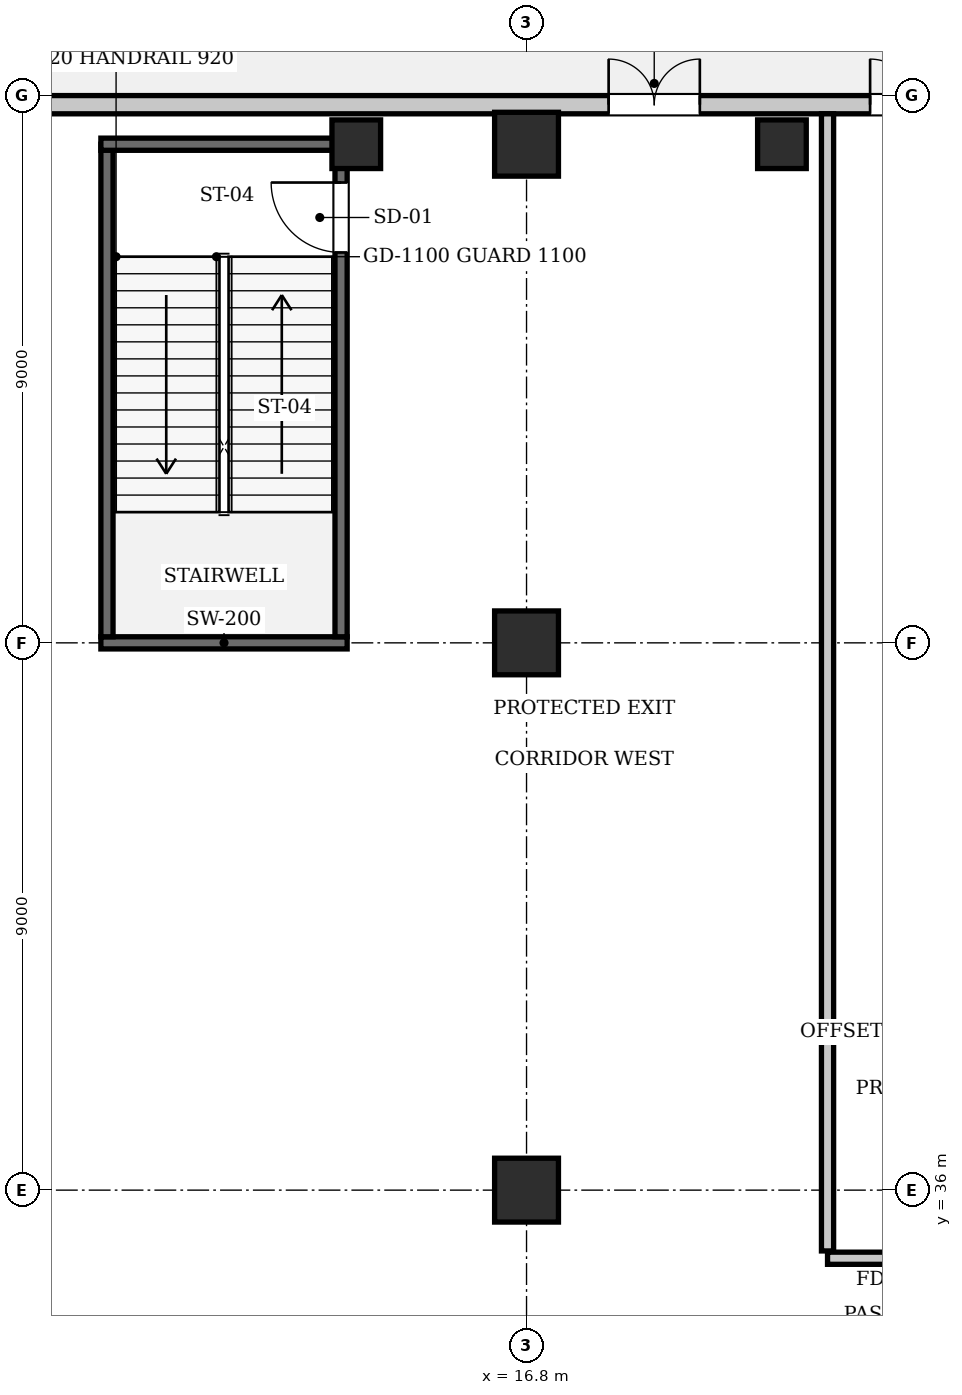
"""IFC4 building model, lengths in metres.
Left out: names, types, materials, properties, quantities, classifications, styles, units other than length and angle.
Written with IfcOpenShell. Run it as: python <this file> out.ifc"""

import sys

from ifc_helpers import new_model, si_unit, direction, frame, frame_2d, origin, origin_2d, place, context, subcontext, project, spatial, rectangle, extrude, element, fill, save


model = new_model("IFC4")
c1 = context("Model", 3, precision=1e-05, world=origin(), true_north=direction((0.0, 1.0)))
c2 = subcontext(c1, "Body", "Model", "MODEL_VIEW")
j1 = project(units=[si_unit("LENGTHUNIT", "METRE"), si_unit("PLANEANGLEUNIT", "RADIAN")], contexts=[c1])
p1 = place(None, origin())
s1 = spatial("IfcSite", under=j1, at=p1, CompositionType="ELEMENT")
p2 = place(p1, origin())
s2 = spatial("IfcBuilding", under=s1, at=p2, CompositionType="ELEMENT")
p3 = place(p2, origin())
s3 = spatial("IfcBuildingStorey", under=s2, at=p3, CompositionType="ELEMENT", Elevation=0.0)
for number, where, z_axis, x_axis in (
    (1, (16.8, 36.0, 0.0), (0.0, 0.0, 1.0), (1.0, 0.0, 0.0)),
    (2, (16.8, 45.0, 0.0), (0.0, 0.0, 1.0), (1.0, 0.0, 0.0)),
    (3, (16.8, 53.2, 0.0), (0.0, 0.0, 1.0), (1.0, 0.0, 0.0)),
):
    element("IfcColumn", number, at=place(p3, frame(where, z_axis=z_axis, x_axis=x_axis)), inside=s3, PredefinedType="COLUMN", context=c2, shape_type="SweptSolid", body=[
        extrude(rectangle(XDim=1.05, YDim=1.05, at=origin_2d()), origin(), (0.0, 0.0, 1.0), 5.6),
    ])
for number, where, z_axis, x_axis in (
    (4, (14.0, 53.2, 0.0), (0.0, 0.0, 1.0), (1.0, 0.0, 0.0)),
    (5, (21.0, 53.2, 0.0), (0.0, 0.0, 1.0), (1.0, 0.0, 0.0)),
):
    element("IfcColumn", number, at=place(p3, frame(where, z_axis=z_axis, x_axis=x_axis)), inside=s3, PredefinedType="PILASTER", context=c2, shape_type="SweptSolid", body=[
        extrude(rectangle(XDim=0.8, YDim=0.8, at=origin_2d()), origin(), (0.0, 0.0, 1.0), 5.6),
    ])
p4 = place(p3, frame((9.8, 45.0, 0.0), z_axis=(0.0, 0.0, 1.0), x_axis=(1.0, 0.0, 0.0)))
e6 = element("IfcWall", 6, at=p4, inside=s3, PredefinedType="SOLIDWALL", context=c2, shape_type="SweptSolid", body=[
    extrude(rectangle(XDim=4.05, YDim=0.2, at=frame_2d((2.025, 0.0))), origin(), (0.0, 0.0, 1.0), 4.685),
])
p5 = place(p3, frame((9.9, 45.1, 0.0), z_axis=(0.0, 0.0, 1.0), x_axis=(0.0, 1.0, 0.0)))
e7 = element("IfcWall", 7, at=p5, inside=s3, PredefinedType="SOLIDWALL", context=c2, shape_type="SweptSolid", body=[
    extrude(rectangle(XDim=8.1, YDim=0.2, at=frame_2d((4.05, 0.0))), origin(), (0.0, 0.0, 1.0), 5.32),
])
p6 = place(p3, frame((13.75, 45.1, 0.0), z_axis=(0.0, 0.0, 1.0), x_axis=(0.0, 1.0, 0.0)))
e8 = element("IfcWall", 8, at=p6, inside=s3, PredefinedType="SOLIDWALL", context=c2, shape_type="SweptSolid", body=[
    extrude(rectangle(XDim=8.1, YDim=0.2, at=frame_2d((4.05, 0.0))), origin(), (0.0, 0.0, 1.0), 5.32),
])
p7 = place(p6, frame((6.32, 0.0, 0.0)))
e9 = element("IfcOpeningElement", 9, at=p7, cuts=e8, PredefinedType="OPENING", context=c2, shape_type="SweptSolid", body=[
    extrude(rectangle(XDim=1.15, YDim=2.15, at=frame_2d((0.575, 1.075))), frame((0.0, 0.11, 0.0), z_axis=(0.0, -1.0, 0.0), x_axis=(1.0, 0.0, 0.0)), (0.0, 0.0, 1.0), 0.22),
])
p8 = place(p3, frame((9.8, 53.2, 0.0), z_axis=(0.0, 0.0, 1.0), x_axis=(1.0, 0.0, 0.0)))
e10 = element("IfcWall", 10, at=p8, inside=s3, PredefinedType="SOLIDWALL", context=c2, shape_type="SweptSolid", body=[
    extrude(rectangle(XDim=4.05, YDim=0.2, at=frame_2d((2.025, 0.0))), origin(), (0.0, 0.0, 1.0), 5.32),
])
p9 = place(p3, frame((6.95, 53.85, 0.0), z_axis=(0.0, 0.0, 1.0), x_axis=(1.0, 0.0, 0.0)))
e11 = element("IfcWall", 11, at=p9, inside=s3, PredefinedType="SOLIDWALL", context=c2, shape_type="SweptSolid", body=[
    extrude(rectangle(XDim=18.25, YDim=0.3, at=frame_2d((9.125, 0.0))), origin(), (0.0, 0.0, 1.0), 5.32),
])
p10 = place(p9, frame((11.2, 0.0, 0.0)))
e12 = element("IfcOpeningElement", 12, at=p10, cuts=e11, PredefinedType="OPENING", context=c2, shape_type="SweptSolid", body=[
    extrude(rectangle(XDim=1.5, YDim=2.2, at=frame_2d((0.75, 1.1))), frame((0.0, 0.16, 0.0), z_axis=(0.0, -1.0, 0.0), x_axis=(1.0, 0.0, 0.0)), (0.0, 0.0, 1.0), 0.32),
])
p11 = place(p9, frame((15.5, 0.0, 0.0)))
e13 = element("IfcOpeningElement", 13, at=p11, cuts=e11, PredefinedType="OPENING", context=c2, shape_type="SweptSolid", body=[
    extrude(rectangle(XDim=1.5, YDim=2.2, at=frame_2d((0.75, 1.1))), frame((0.0, 0.16, 0.0), z_axis=(0.0, -1.0, 0.0), x_axis=(1.0, 0.0, 0.0)), (0.0, 0.0, 1.0), 0.32),
])
p12 = place(p3, frame((21.75, 34.88, 0.0), z_axis=(0.0, 0.0, 1.0), x_axis=(1.0, 0.0, 0.0)))
e14 = element("IfcWall", 14, at=p12, inside=s3, PredefinedType="PARTITIONING", context=c2, shape_type="SweptSolid", body=[
    extrude(rectangle(XDim=10.2, YDim=0.2, at=frame_2d((5.1, 0.0))), origin(), (0.0, 0.0, 1.0), 5.32),
])
p13 = place(p12, frame((1.2, 0.0, 0.0)))
e15 = element("IfcOpeningElement", 15, at=p13, cuts=e14, PredefinedType="OPENING", context=c2, shape_type="SweptSolid", body=[
    extrude(rectangle(XDim=1.15, YDim=2.15, at=frame_2d((0.575, 1.075))), frame((0.0, 0.11, 0.0), z_axis=(0.0, -1.0, 0.0), x_axis=(1.0, 0.0, 0.0)), (0.0, 0.0, 1.0), 0.22),
])
p14 = place(p3, frame((21.75, 35.0, 0.0), z_axis=(0.0, 0.0, 1.0), x_axis=(0.0, 1.0, 0.0)))
e16 = element("IfcWall", 16, at=p14, inside=s3, PredefinedType="PARTITIONING", context=c2, shape_type="SweptSolid", body=[
    extrude(rectangle(XDim=18.7, YDim=0.2, at=frame_2d((9.35, 0.0))), origin(), (0.0, 0.0, 1.0), 5.32),
])
p15 = place(p7, origin())
e17 = element("IfcDoor", 17, at=p15, inside=s3, OperationType="SINGLE_SWING_RIGHT", PredefinedType="DOOR", context=c2, shape_type="SweptSolid", body=[
    extrude(rectangle(XDim=1.15, YDim=2.15, at=frame_2d((0.575, 1.075))), frame((0.0, 0.025, 0.0), z_axis=(0.0, -1.0, 0.0), x_axis=(1.0, 0.0, 0.0)), (0.0, 0.0, 1.0), 0.05),
])
fill(e9, e17)
p16 = place(p10, origin())
e18 = element("IfcDoor", 18, at=p16, inside=s3, OperationType="DOUBLE_DOOR_SINGLE_SWING", PredefinedType="DOOR", context=c2, shape_type="SweptSolid", body=[
    extrude(rectangle(XDim=1.5, YDim=2.2, at=frame_2d((0.75, 1.1))), frame((0.0, 0.025, 0.0), z_axis=(0.0, -1.0, 0.0), x_axis=(1.0, 0.0, 0.0)), (0.0, 0.0, 1.0), 0.05),
])
fill(e12, e18)
p17 = place(p11, origin())
e19 = element("IfcDoor", 19, at=p17, inside=s3, OperationType="DOUBLE_DOOR_SINGLE_SWING", PredefinedType="DOOR", context=c2, shape_type="SweptSolid", body=[
    extrude(rectangle(XDim=1.5, YDim=2.2, at=frame_2d((0.75, 1.1))), frame((0.0, 0.025, 0.0), z_axis=(0.0, -1.0, 0.0), x_axis=(1.0, 0.0, 0.0)), (0.0, 0.0, 1.0), 0.05),
])
fill(e13, e19)
save(model, sys.argv[1])
